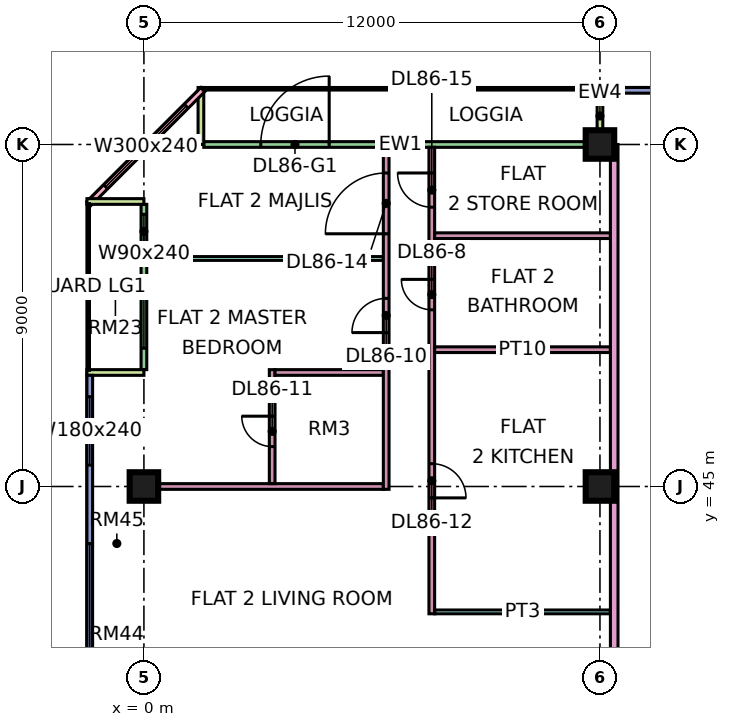
"""IFC4 building model, lengths in metres.
Left out: names, types, materials, properties, quantities, classifications, styles, units other than length and angle.
Written with IfcOpenShell. Run it as: python <this file> out.ifc"""

import sys

from ifc_helpers import new_model, si_unit, direction, frame, frame_2d, origin, origin_2d, place, context, subcontext, project, spatial, rectangle, extrude, element, fill, save


model = new_model("IFC4")
c1 = context("Model", 3, precision=1e-05, world=origin(), true_north=direction((0.0, 1.0)))
c2 = subcontext(c1, "Body", "Model", "MODEL_VIEW")
j1 = project(units=[si_unit("LENGTHUNIT", "METRE"), si_unit("PLANEANGLEUNIT", "RADIAN")], contexts=[c1])
p1 = place(None, origin())
s1 = spatial("IfcSite", under=j1, at=p1, CompositionType="ELEMENT")
p2 = place(p1, origin())
s2 = spatial("IfcBuilding", under=s1, at=p2, CompositionType="ELEMENT")
p3 = place(p2, frame((0.0, 0.0, 368.9)))
s3 = spatial("IfcBuildingStorey", under=s2, at=p3, CompositionType="ELEMENT", Elevation=368.9)
p4 = place(p3, frame((0.0, 45.0, 0.0), z_axis=(0.0, 0.0, 1.0), x_axis=(1.0, 0.0, 0.0)))
e1 = element("IfcColumn", 1, at=p4, inside=s3, PredefinedType="COLUMN", context=c2, shape_type="SweptSolid", body=[
    extrude(rectangle(XDim=0.75, YDim=0.75, at=origin_2d()), origin(), (0.0, 0.0, 1.0), 3.75),
])
for number, where, z_axis, x_axis in (
    (2, (12.0, 45.0, 0.0), (0.0, 0.0, 1.0), (1.0, 0.0, 0.0)),
    (3, (12.0, 54.0, 0.0), (0.0, 0.0, 1.0), (1.0, 0.0, 0.0)),
):
    element("IfcColumn", number, at=place(p3, frame(where, z_axis=z_axis, x_axis=x_axis)), inside=s3, PredefinedType="COLUMN", context=c2, shape_type="SweptSolid", body=[
        extrude(rectangle(XDim=0.75, YDim=0.75, at=origin_2d()), origin(), (0.0, 0.0, 1.0), 3.75),
    ])
p5 = place(p3, frame((22.5, 55.425, 0.0), z_axis=(0.0, 0.0, 1.0), x_axis=(-1.0, 0.0, 0.0)))
e4 = element("IfcWall", 4, at=p5, inside=s3, PredefinedType="SOLIDWALL", context=c2, shape_type="SweptSolid", body=[
    extrude(rectangle(XDim=10.425, YDim=0.15, at=frame_2d((5.212, 0.0))), origin(), (0.0, 0.0, 1.0), 3.35),
])
p6 = place(p5, frame((1.05, 0.0, 0.45)))
e5 = element("IfcOpeningElement", 5, at=p6, cuts=e4, PredefinedType="OPENING", context=c2, shape_type="SweptSolid", body=[
    extrude(rectangle(XDim=4.8, YDim=2.4, at=frame_2d((2.4, 1.2))), frame((0.0, 0.085, 0.0), z_axis=(0.0, -1.0, 0.0), x_axis=(1.0, 0.0, 0.0)), (0.0, 0.0, 1.0), 0.17),
])
p7 = place(p3, frame((11.925, 54.0, 0.0), z_axis=(0.0, 0.0, 1.0), x_axis=(-1.0, 0.0, 0.0)))
e6 = element("IfcWall", 6, at=p7, inside=s3, PredefinedType="SOLIDWALL", context=c2, shape_type="SweptSolid", body=[
    extrude(rectangle(XDim=10.35, YDim=0.15, at=frame_2d((5.175, 0.0))), origin(), (0.0, 0.0, 1.0), 3.35),
])
p8 = place(p7, frame((7.05, 0.0, 0.0)))
e7 = element("IfcOpeningElement", 7, at=p8, cuts=e6, PredefinedType="OPENING", context=c2, shape_type="SweptSolid", body=[
    extrude(rectangle(XDim=1.8, YDim=2.4, at=frame_2d((0.9, 1.2))), frame((0.0, 0.085, 0.0), z_axis=(0.0, -1.0, 0.0), x_axis=(1.0, 0.0, 0.0)), (0.0, 0.0, 1.0), 0.17),
])
for number, where, z_axis, x_axis in (
    (8, (12.0, 55.5, 0.0), (0.0, 0.0, 1.0), (0.0, -1.0, 0.0)),
    (9, (1.5, 55.5, 0.0), (0.0, 0.0, 1.0), (0.0, -1.0, 0.0)),
):
    element("IfcWall", number, at=place(p3, frame(where, z_axis=z_axis, x_axis=x_axis)), inside=s3, PredefinedType="SOLIDWALL", context=c2, shape_type="SweptSolid", body=[
        extrude(rectangle(XDim=1.5, YDim=0.15, at=frame_2d((0.75, 0.0))), origin(), (0.0, 0.0, 1.0), 3.35),
    ])
p9 = place(p3, frame((1.553, 55.447, 0.0), z_axis=(0.0, 0.0, 1.0), x_axis=(-0.707106781187, -0.707106781187, 0.0)))
e10 = element("IfcWall", 10, at=p9, inside=s3, PredefinedType="SOLIDWALL", context=c2, shape_type="SweptSolid", body=[
    extrude(rectangle(XDim=4.243, YDim=0.15, at=frame_2d((2.121, 0.0))), origin(), (0.0, 0.0, 1.0), 3.35),
])
p10 = place(p9, frame((0.621, 0.0, 0.45)))
e11 = element("IfcOpeningElement", 11, at=p10, cuts=e10, PredefinedType="OPENING", context=c2, shape_type="SweptSolid", body=[
    extrude(rectangle(XDim=3.0, YDim=2.4, at=frame_2d((1.5, 1.2))), frame((0.0, 0.085, 0.0), z_axis=(0.0, -1.0, 0.0), x_axis=(1.0, 0.0, 0.0)), (0.0, 0.0, 1.0), 0.17),
])
p11 = place(p3, frame((0.0, 52.425, 0.0), z_axis=(0.0, 0.0, 1.0), x_axis=(0.0, -1.0, 0.0)))
e12 = element("IfcWall", 12, at=p11, inside=s3, PredefinedType="SOLIDWALL", context=c2, shape_type="SweptSolid", body=[
    extrude(rectangle(XDim=4.35, YDim=0.15, at=frame_2d((2.175, 0.0))), origin(), (0.0, 0.0, 1.0), 3.35),
])
p12 = place(p11, frame((0.262, 0.0, 0.45)))
e13 = element("IfcOpeningElement", 13, at=p12, cuts=e12, PredefinedType="OPENING", context=c2, shape_type="SweptSolid", body=[
    extrude(rectangle(XDim=0.9, YDim=2.4, at=frame_2d((0.45, 1.2))), frame((0.0, 0.085, 0.0), z_axis=(0.0, -1.0, 0.0), x_axis=(1.0, 0.0, 0.0)), (0.0, 0.0, 1.0), 0.17),
])
p13 = place(p11, frame((1.988, 0.0, 0.45)))
e14 = element("IfcOpeningElement", 14, at=p13, cuts=e12, PredefinedType="OPENING", context=c2, shape_type="SweptSolid", body=[
    extrude(rectangle(XDim=1.8, YDim=2.4, at=frame_2d((0.9, 1.2))), frame((0.0, 0.085, 0.0), z_axis=(0.0, -1.0, 0.0), x_axis=(1.0, 0.0, 0.0)), (0.0, 0.0, 1.0), 0.17),
])
for number, where, z_axis, x_axis in (
    (15, (-1.5, 52.5, 0.0), (0.0, 0.0, 1.0), (1.0, 0.0, 0.0)),
    (16, (-1.5, 48.0, 0.0), (0.0, 0.0, 1.0), (1.0, 0.0, 0.0)),
):
    element("IfcWall", number, at=place(p3, frame(where, z_axis=z_axis, x_axis=x_axis)), inside=s3, PredefinedType="SOLIDWALL", context=c2, shape_type="SweptSolid", body=[
        extrude(rectangle(XDim=1.5, YDim=0.15, at=frame_2d((0.75, 0.0))), origin(), (0.0, 0.0, 1.0), 3.35),
    ])
p14 = place(p3, frame((-1.425, 47.925, 0.0), z_axis=(0.0, 0.0, 1.0), x_axis=(0.0, -1.0, 0.0)))
e17 = element("IfcWall", 17, at=p14, inside=s3, PredefinedType="SOLIDWALL", context=c2, shape_type="SweptSolid", body=[
    extrude(rectangle(XDim=11.85, YDim=0.15, at=frame_2d((5.925, 0.0))), origin(), (0.0, 0.0, 1.0), 3.35),
])
p15 = place(p14, frame((0.562, 0.0, 0.45)))
e18 = element("IfcOpeningElement", 18, at=p15, cuts=e17, PredefinedType="OPENING", context=c2, shape_type="SweptSolid", body=[
    extrude(rectangle(XDim=1.8, YDim=2.4, at=frame_2d((0.9, 1.2))), frame((0.0, 0.085, 0.0), z_axis=(0.0, -1.0, 0.0), x_axis=(1.0, 0.0, 0.0)), (0.0, 0.0, 1.0), 0.17),
])
p16 = place(p14, frame((4.425, 0.0, 0.45)))
e19 = element("IfcOpeningElement", 19, at=p16, cuts=e17, PredefinedType="OPENING", context=c2, shape_type="SweptSolid", body=[
    extrude(rectangle(XDim=3.0, YDim=2.4, at=frame_2d((1.5, 1.2))), frame((0.0, 0.085, 0.0), z_axis=(0.0, -1.0, 0.0), x_axis=(1.0, 0.0, 0.0)), (0.0, 0.0, 1.0), 0.17),
])
p17 = place(p14, frame((9.488, 0.0, 0.45)))
e20 = element("IfcOpeningElement", 20, at=p17, cuts=e17, PredefinedType="OPENING", context=c2, shape_type="SweptSolid", body=[
    extrude(rectangle(XDim=1.8, YDim=2.4, at=frame_2d((0.9, 1.2))), frame((0.0, 0.085, 0.0), z_axis=(0.0, -1.0, 0.0), x_axis=(1.0, 0.0, 0.0)), (0.0, 0.0, 1.0), 0.17),
])
e21 = element("IfcWall", 21, at=p4, inside=s3, PredefinedType="PARTITIONING", context=c2, shape_type="SweptSolid", body=[
    extrude(rectangle(XDim=6.3, YDim=0.15, at=frame_2d((3.15, 0.0))), origin(), (0.0, 0.0, 1.0), 3.35),
])
p18 = place(p3, frame((0.074, 51.0, 0.0), z_axis=(0.0, 0.0, 1.0), x_axis=(1.0, 0.0, 0.0)))
e22 = element("IfcWall", 22, at=p18, inside=s3, PredefinedType="PARTITIONING", context=c2, shape_type="SweptSolid", body=[
    extrude(rectangle(XDim=6.226, YDim=0.1, at=frame_2d((3.113, 0.0))), origin(), (0.0, 0.0, 1.0), 3.35),
])
p19 = place(p3, frame((3.375, 45.075, 0.0), z_axis=(0.0, 0.0, 1.0), x_axis=(0.0, 1.0, 0.0)))
e23 = element("IfcWall", 23, at=p19, inside=s3, PredefinedType="PARTITIONING", context=c2, shape_type="SweptSolid", body=[
    extrude(rectangle(XDim=3.0, YDim=0.15, at=frame_2d((1.5, 0.0))), origin(), (0.0, 0.0, 1.0), 3.35),
])
p20 = place(p19, frame((0.975, 0.0, 0.0)))
e24 = element("IfcOpeningElement", 24, at=p20, cuts=e23, PredefinedType="OPENING", context=c2, shape_type="SweptSolid", body=[
    extrude(rectangle(XDim=0.8, YDim=2.1, at=frame_2d((0.4, 1.05))), frame((0.0, 0.085, 0.0), z_axis=(0.0, -1.0, 0.0), x_axis=(1.0, 0.0, 0.0)), (0.0, 0.0, 1.0), 0.17),
])
p21 = place(p3, frame((3.45, 48.0, 0.0), z_axis=(0.0, 0.0, 1.0), x_axis=(1.0, 0.0, 0.0)))
e25 = element("IfcWall", 25, at=p21, inside=s3, PredefinedType="PARTITIONING", context=c2, shape_type="SweptSolid", body=[
    extrude(rectangle(XDim=2.85, YDim=0.15, at=frame_2d((1.425, 0.0))), origin(), (0.0, 0.0, 1.0), 3.35),
])
p22 = place(p3, frame((6.375, 44.925, 0.0), z_axis=(0.0, 0.0, 1.0), x_axis=(0.0, 1.0, 0.0)))
e26 = element("IfcWall", 26, at=p22, inside=s3, PredefinedType="PARTITIONING", context=c2, shape_type="SweptSolid", body=[
    extrude(rectangle(XDim=9.001, YDim=0.15, at=frame_2d((4.5, 0.0))), origin(), (0.0, 0.0, 1.0), 3.35),
])
p23 = place(p22, frame((4.125, 0.0, 0.0)))
e27 = element("IfcOpeningElement", 27, at=p23, cuts=e26, PredefinedType="OPENING", context=c2, shape_type="SweptSolid", body=[
    extrude(rectangle(XDim=0.9, YDim=2.1, at=frame_2d((0.45, 1.05))), frame((0.0, 0.085, 0.0), z_axis=(0.0, -1.0, 0.0), x_axis=(1.0, 0.0, 0.0)), (0.0, 0.0, 1.0), 0.17),
])
p24 = place(p22, frame((6.725, 0.0, 0.0)))
e28 = element("IfcOpeningElement", 28, at=p24, cuts=e26, PredefinedType="OPENING", context=c2, shape_type="SweptSolid", body=[
    extrude(rectangle(XDim=1.6, YDim=2.1, at=frame_2d((0.8, 1.05))), frame((0.0, 0.085, 0.0), z_axis=(0.0, -1.0, 0.0), x_axis=(1.0, 0.0, 0.0)), (0.0, 0.0, 1.0), 0.17),
])
p25 = place(p3, frame((7.575, 41.65, 0.0), z_axis=(0.0, 0.0, 1.0), x_axis=(0.0, 1.0, 0.0)))
e29 = element("IfcWall", 29, at=p25, inside=s3, PredefinedType="PARTITIONING", context=c2, shape_type="SweptSolid", body=[
    extrude(rectangle(XDim=12.276, YDim=0.15, at=frame_2d((6.138, 0.0))), origin(), (0.0, 0.0, 1.0), 3.35),
])
p26 = place(p25, frame((8.0, 0.0, 0.0)))
e30 = element("IfcOpeningElement", 30, at=p26, cuts=e29, PredefinedType="OPENING", context=c2, shape_type="SweptSolid", body=[
    extrude(rectangle(XDim=0.8, YDim=2.1, at=frame_2d((0.4, 1.05))), frame((0.0, 0.085, 0.0), z_axis=(0.0, -1.0, 0.0), x_axis=(1.0, 0.0, 0.0)), (0.0, 0.0, 1.0), 0.17),
])
p27 = place(p25, frame((3.05, 0.0, 0.0)))
e31 = element("IfcOpeningElement", 31, at=p27, cuts=e29, PredefinedType="OPENING", context=c2, shape_type="SweptSolid", body=[
    extrude(rectangle(XDim=0.9, YDim=2.1, at=frame_2d((0.45, 1.05))), frame((0.0, 0.085, 0.0), z_axis=(0.0, -1.0, 0.0), x_axis=(1.0, 0.0, 0.0)), (0.0, 0.0, 1.0), 0.17),
])
p28 = place(p25, frame((10.7, 0.0, 0.0)))
e32 = element("IfcOpeningElement", 32, at=p28, cuts=e29, PredefinedType="OPENING", context=c2, shape_type="SweptSolid", body=[
    extrude(rectangle(XDim=0.9, YDim=2.1, at=frame_2d((0.45, 1.05))), frame((0.0, 0.085, 0.0), z_axis=(0.0, -1.0, 0.0), x_axis=(1.0, 0.0, 0.0)), (0.0, 0.0, 1.0), 0.17),
])
p29 = place(p3, frame((7.65, 41.7, 0.0), z_axis=(0.0, 0.0, 1.0), x_axis=(1.0, 0.0, 0.0)))
e33 = element("IfcWall", 33, at=p29, inside=s3, PredefinedType="PARTITIONING", context=c2, shape_type="SweptSolid", body=[
    extrude(rectangle(XDim=4.625, YDim=0.1, at=frame_2d((2.312, 0.0))), origin(), (0.0, 0.0, 1.0), 3.35),
])
for number, where, z_axis, x_axis in (
    (34, (7.65, 48.6, 0.0), (0.0, 0.0, 1.0), (1.0, 0.0, 0.0)),
    (35, (7.65, 51.6, 0.0), (0.0, 0.0, 1.0), (1.0, 0.0, 0.0)),
):
    element("IfcWall", number, at=place(p3, frame(where, z_axis=z_axis, x_axis=x_axis)), inside=s3, PredefinedType="PARTITIONING", context=c2, shape_type="SweptSolid", body=[
        extrude(rectangle(XDim=4.625, YDim=0.15, at=frame_2d((2.312, 0.0))), origin(), (0.0, 0.0, 1.0), 3.35),
    ])
p30 = place(p3, frame((12.375, 20.0, 0.0), z_axis=(0.0, 0.0, 1.0), x_axis=(0.0, 1.0, 0.0)))
e36 = element("IfcWall", 36, at=p30, inside=s3, PredefinedType="PARTITIONING", context=c2, shape_type="SweptSolid", body=[
    extrude(rectangle(XDim=34.0, YDim=0.2, at=frame_2d((17.0, 0.0))), origin(), (0.0, 0.0, 1.0), 3.35),
])
p31 = place(p30, frame((16.8, 0.0, 0.0)))
e37 = element("IfcOpeningElement", 37, at=p31, cuts=e36, PredefinedType="OPENING", context=c2, shape_type="SweptSolid", body=[
    extrude(rectangle(XDim=1.0, YDim=2.1, at=frame_2d((0.5, 1.05))), frame((0.0, 0.11, 0.0), z_axis=(0.0, -1.0, 0.0), x_axis=(1.0, 0.0, 0.0)), (0.0, 0.0, 1.0), 0.22),
])
p32 = place(p30, frame((0.6, 0.0, 0.0)))
e38 = element("IfcOpeningElement", 38, at=p32, cuts=e36, PredefinedType="OPENING", context=c2, shape_type="SweptSolid", body=[
    extrude(rectangle(XDim=1.2, YDim=2.1, at=frame_2d((0.6, 1.05))), frame((0.0, 0.11, 0.0), z_axis=(0.0, -1.0, 0.0), x_axis=(1.0, 0.0, 0.0)), (0.0, 0.0, 1.0), 0.22),
])
p33 = place(p30, frame((4.5, 0.0, 0.0)))
e39 = element("IfcOpeningElement", 39, at=p33, cuts=e36, PredefinedType="OPENING", context=c2, shape_type="SweptSolid", body=[
    extrude(rectangle(XDim=1.0, YDim=2.1, at=frame_2d((0.5, 1.05))), frame((0.0, 0.11, 0.0), z_axis=(0.0, -1.0, 0.0), x_axis=(1.0, 0.0, 0.0)), (0.0, 0.0, 1.0), 0.22),
])
p34 = place(p8, frame((1.8, 0.0, 0.0), z_axis=(0.0, 0.0, 1.0), x_axis=(-1.0, 0.0, 0.0)))
e40 = element("IfcDoor", 40, at=p34, inside=s3, OperationType="DOUBLE_DOOR_SINGLE_SWING", PredefinedType="DOOR", context=c2, shape_type="SweptSolid", body=[
    extrude(rectangle(XDim=1.8, YDim=2.4, at=frame_2d((0.9, 1.2))), frame((0.0, 0.025, 0.0), z_axis=(0.0, -1.0, 0.0), x_axis=(1.0, 0.0, 0.0)), (0.0, 0.0, 1.0), 0.05),
])
fill(e7, e40)
p35 = place(p10, origin())
e41 = element("IfcWindow", 41, at=p35, inside=s3, PartitioningType="SINGLE_PANEL", PredefinedType="WINDOW", context=c2, shape_type="SweptSolid", body=[
    extrude(rectangle(XDim=3.0, YDim=2.4, at=frame_2d((1.5, 1.2))), frame((0.0, 0.03, 0.0), z_axis=(0.0, -1.0, 0.0), x_axis=(1.0, 0.0, 0.0)), (0.0, 0.0, 1.0), 0.06),
])
fill(e11, e41)
p36 = place(p12, origin())
e42 = element("IfcWindow", 42, at=p36, inside=s3, PartitioningType="SINGLE_PANEL", PredefinedType="WINDOW", context=c2, shape_type="SweptSolid", body=[
    extrude(rectangle(XDim=0.9, YDim=2.4, at=frame_2d((0.45, 1.2))), frame((0.0, 0.03, 0.0), z_axis=(0.0, -1.0, 0.0), x_axis=(1.0, 0.0, 0.0)), (0.0, 0.0, 1.0), 0.06),
])
fill(e13, e42)
p37 = place(p13, origin())
e43 = element("IfcWindow", 43, at=p37, inside=s3, PartitioningType="SINGLE_PANEL", PredefinedType="WINDOW", context=c2, shape_type="SweptSolid", body=[
    extrude(rectangle(XDim=1.8, YDim=2.4, at=frame_2d((0.9, 1.2))), frame((0.0, 0.03, 0.0), z_axis=(0.0, -1.0, 0.0), x_axis=(1.0, 0.0, 0.0)), (0.0, 0.0, 1.0), 0.06),
])
fill(e14, e43)
p38 = place(p15, origin())
e44 = element("IfcWindow", 44, at=p38, inside=s3, PartitioningType="SINGLE_PANEL", PredefinedType="WINDOW", context=c2, shape_type="SweptSolid", body=[
    extrude(rectangle(XDim=1.8, YDim=2.4, at=frame_2d((0.9, 1.2))), frame((0.0, 0.03, 0.0), z_axis=(0.0, -1.0, 0.0), x_axis=(1.0, 0.0, 0.0)), (0.0, 0.0, 1.0), 0.06),
])
fill(e18, e44)
p39 = place(p16, origin())
e45 = element("IfcWindow", 45, at=p39, inside=s3, PartitioningType="SINGLE_PANEL", PredefinedType="WINDOW", context=c2, shape_type="SweptSolid", body=[
    extrude(rectangle(XDim=3.0, YDim=2.4, at=frame_2d((1.5, 1.2))), frame((0.0, 0.03, 0.0), z_axis=(0.0, -1.0, 0.0), x_axis=(1.0, 0.0, 0.0)), (0.0, 0.0, 1.0), 0.06),
])
fill(e19, e45)
p40 = place(p26, frame((0.8, 0.0, 0.0), z_axis=(0.0, 0.0, 1.0), x_axis=(-1.0, 0.0, 0.0)))
e46 = element("IfcDoor", 46, at=p40, inside=s3, OperationType="SINGLE_SWING_RIGHT", PredefinedType="DOOR", context=c2, shape_type="SweptSolid", body=[
    extrude(rectangle(XDim=0.8, YDim=2.1, at=frame_2d((0.4, 1.05))), frame((0.0, 0.025, 0.0), z_axis=(0.0, -1.0, 0.0), x_axis=(1.0, 0.0, 0.0)), (0.0, 0.0, 1.0), 0.05),
])
fill(e30, e46)
p41 = place(p23, origin())
e47 = element("IfcDoor", 47, at=p41, inside=s3, OperationType="SINGLE_SWING_LEFT", PredefinedType="DOOR", context=c2, shape_type="SweptSolid", body=[
    extrude(rectangle(XDim=0.9, YDim=2.1, at=frame_2d((0.45, 1.05))), frame((0.0, 0.025, 0.0), z_axis=(0.0, -1.0, 0.0), x_axis=(1.0, 0.0, 0.0)), (0.0, 0.0, 1.0), 0.05),
])
fill(e27, e47)
p42 = place(p20, frame((0.8, 0.0, 0.0), z_axis=(0.0, 0.0, 1.0), x_axis=(-1.0, 0.0, 0.0)))
e48 = element("IfcDoor", 48, at=p42, inside=s3, OperationType="SINGLE_SWING_RIGHT", PredefinedType="DOOR", context=c2, shape_type="SweptSolid", body=[
    extrude(rectangle(XDim=0.8, YDim=2.1, at=frame_2d((0.4, 1.05))), frame((0.0, 0.025, 0.0), z_axis=(0.0, -1.0, 0.0), x_axis=(1.0, 0.0, 0.0)), (0.0, 0.0, 1.0), 0.05),
])
fill(e24, e48)
p43 = place(p27, frame((0.9, 0.0, 0.0), z_axis=(0.0, 0.0, 1.0), x_axis=(-1.0, 0.0, 0.0)))
e49 = element("IfcDoor", 49, at=p43, inside=s3, OperationType="SINGLE_SWING_LEFT", PredefinedType="DOOR", context=c2, shape_type="SweptSolid", body=[
    extrude(rectangle(XDim=0.9, YDim=2.1, at=frame_2d((0.45, 1.05))), frame((0.0, 0.025, 0.0), z_axis=(0.0, -1.0, 0.0), x_axis=(1.0, 0.0, 0.0)), (0.0, 0.0, 1.0), 0.05),
])
fill(e31, e49)
p44 = place(p24, origin())
e50 = element("IfcDoor", 50, at=p44, inside=s3, OperationType="DOUBLE_DOOR_SINGLE_SWING", PredefinedType="DOOR", context=c2, shape_type="SweptSolid", body=[
    extrude(rectangle(XDim=1.6, YDim=2.1, at=frame_2d((0.8, 1.05))), frame((0.0, 0.025, 0.0), z_axis=(0.0, -1.0, 0.0), x_axis=(1.0, 0.0, 0.0)), (0.0, 0.0, 1.0), 0.05),
])
fill(e28, e50)
p45 = place(p28, frame((0.9, 0.0, 0.0), z_axis=(0.0, 0.0, 1.0), x_axis=(-1.0, 0.0, 0.0)))
e51 = element("IfcDoor", 51, at=p45, inside=s3, OperationType="SINGLE_SWING_RIGHT", PredefinedType="DOOR", context=c2, shape_type="SweptSolid", body=[
    extrude(rectangle(XDim=0.9, YDim=2.1, at=frame_2d((0.45, 1.05))), frame((0.0, 0.025, 0.0), z_axis=(0.0, -1.0, 0.0), x_axis=(1.0, 0.0, 0.0)), (0.0, 0.0, 1.0), 0.05),
])
fill(e32, e51)
save(model, sys.argv[1])
